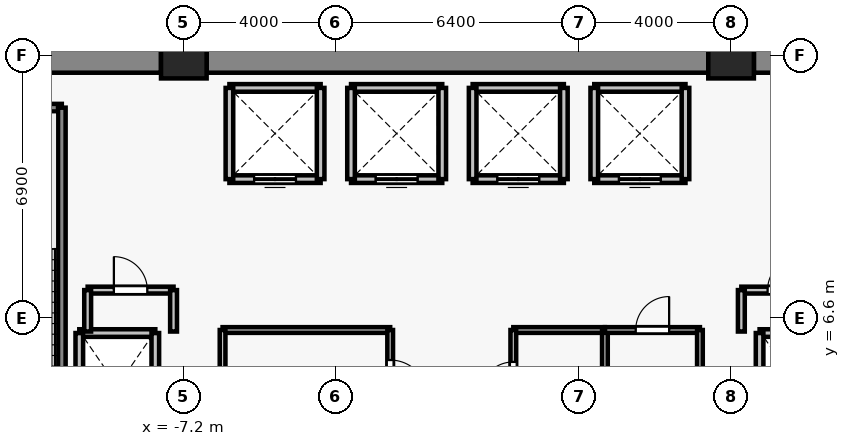
"""IFC4 building model, lengths in metres.
Left out: names, types, materials, properties, quantities, classifications, styles, units other than length and angle.
Written with IfcOpenShell. Run it as: python <this file> out.ifc"""

import sys

from ifc_helpers import new_model, si_unit, direction, frame, frame_2d, origin, origin_2d, place, context, subcontext, project, spatial, rectangle, extrude, source, transform, mapped, element, fill, save


model = new_model("IFC4")
c1 = context("Model", 3, precision=1e-05, world=origin(), true_north=direction((0.0, 1.0)))
c2 = subcontext(c1, "Body", "Model", "MODEL_VIEW")
j1 = project(units=[si_unit("LENGTHUNIT", "METRE"), si_unit("PLANEANGLEUNIT", "RADIAN")], contexts=[c1])
p1 = place(None, origin())
s1 = spatial("IfcSite", under=j1, at=p1, CompositionType="ELEMENT")
p2 = place(p1, origin())
s2 = spatial("IfcBuilding", under=s1, at=p2, CompositionType="ELEMENT")
p3 = place(p2, frame((0.0, 0.0, -4.4)))
s3 = spatial("IfcBuildingStorey", under=s2, at=p3, CompositionType="ELEMENT", Elevation=-4.4)
for number, where, z_axis, x_axis in (
    (1, (-7.2, 13.5, 0.0), (0.0, 0.0, 1.0), (1.0, 0.0, 0.0)),
    (2, (7.2, 13.5, 0.0), (0.0, 0.0, 1.0), (1.0, 0.0, 0.0)),
):
    element("IfcColumn", number, at=place(p3, frame(where, z_axis=z_axis, x_axis=x_axis)), inside=s3, PredefinedType="COLUMN", context=c2, shape_type="SweptSolid", body=[
        extrude(rectangle(XDim=1.2, YDim=1.2, at=origin_2d()), origin(), (0.0, 0.0, 1.0), 4.4),
    ])
p4 = place(p3, frame((-13.8, 13.5, 0.0), z_axis=(0.0, 0.0, 1.0), x_axis=(1.0, 0.0, 0.0)))
e3 = element("IfcWall", 3, at=p4, inside=s3, PredefinedType="SHEAR", context=c2, shape_type="SweptSolid", body=[
    extrude(rectangle(XDim=6.0, YDim=0.9, at=frame_2d((3.0, 0.0))), origin(), (0.0, 0.0, 1.0), 4.1),
])
p5 = place(p3, frame((-6.6, 13.5, 0.0), z_axis=(0.0, 0.0, 1.0), x_axis=(1.0, 0.0, 0.0)))
e4 = element("IfcWall", 4, at=p5, inside=s3, PredefinedType="SHEAR", context=c2, shape_type="SweptSolid", body=[
    extrude(rectangle(XDim=13.2, YDim=0.9, at=frame_2d((6.6, 0.0))), origin(), (0.0, 0.0, 1.0), 4.1),
])
p6 = place(p3, frame((7.8, 13.5, 0.0), z_axis=(0.0, 0.0, 1.0), x_axis=(1.0, 0.0, 0.0)))
e5 = element("IfcWall", 5, at=p6, inside=s3, PredefinedType="SHEAR", context=c2, shape_type="SweptSolid", body=[
    extrude(rectangle(XDim=6.0, YDim=0.9, at=frame_2d((3.0, 0.0))), origin(), (0.0, 0.0, 1.0), 4.1),
])
p7 = place(p3, frame((-9.95, 6.2, 0.0), z_axis=(0.0, 0.0, 1.0), x_axis=(1.0, 0.0, 0.0)))
e6 = element("IfcWall", 6, at=p7, inside=s3, PredefinedType="SOLIDWALL", context=c2, shape_type="SweptSolid", body=[
    extrude(rectangle(XDim=2.0, YDim=0.2, at=frame_2d((1.0, 0.0))), origin(), (0.0, 0.0, 1.0), 4.1),
])
for number, where, z_axis, x_axis in (
    (7, (-9.95, 3.4, 0.0), (0.0, 0.0, 1.0), (0.0, 1.0, 0.0)),
    (8, (-7.95, 6.2, 0.0), (0.0, 0.0, 1.0), (0.0, -1.0, 0.0)),
):
    element("IfcWall", number, at=place(p3, frame(where, z_axis=z_axis, x_axis=x_axis)), inside=s3, PredefinedType="SOLIDWALL", context=c2, shape_type="SweptSolid", body=[
        extrude(rectangle(XDim=2.8, YDim=0.2, at=frame_2d((1.4, 0.0))), origin(), (0.0, 0.0, 1.0), 4.1),
    ])
p8 = place(p3, frame((7.95, 6.2, 0.0), z_axis=(0.0, 0.0, 1.0), x_axis=(1.0, 0.0, 0.0)))
e9 = element("IfcWall", 9, at=p8, inside=s3, PredefinedType="SOLIDWALL", context=c2, shape_type="SweptSolid", body=[
    extrude(rectangle(XDim=2.0, YDim=0.2, at=frame_2d((1.0, 0.0))), origin(), (0.0, 0.0, 1.0), 4.1),
])
p9 = place(p3, frame((7.95, 3.4, 0.0), z_axis=(0.0, 0.0, 1.0), x_axis=(0.0, 1.0, 0.0)))
e10 = element("IfcWall", 10, at=p9, inside=s3, PredefinedType="SOLIDWALL", context=c2, shape_type="SweptSolid", body=[
    extrude(rectangle(XDim=2.8, YDim=0.2, at=frame_2d((1.4, 0.0))), origin(), (0.0, 0.0, 1.0), 4.1),
])
p10 = place(p3, frame((-3.6, 10.25, 0.0), z_axis=(0.0, 0.0, 1.0), x_axis=(-1.0, 0.0, 0.0)))
e11 = element("IfcWall", 11, at=p10, inside=s3, PredefinedType="SOLIDWALL", context=c2, shape_type="SweptSolid", body=[
    extrude(rectangle(XDim=2.4, YDim=0.2, at=frame_2d((1.2, 0.0))), origin(), (0.0, 0.0, 1.0), 4.1),
])
p11 = place(p10, frame((0.65, 0.0, 0.0)))
e12 = element("IfcOpeningElement", 12, at=p11, cuts=e11, PredefinedType="OPENING", context=c2, shape_type="SweptSolid", body=[
    extrude(rectangle(XDim=1.1, YDim=2.2, at=frame_2d((0.55, 1.1))), frame((0.0, 0.11, 0.0), z_axis=(0.0, -1.0, 0.0), x_axis=(1.0, 0.0, 0.0)), (0.0, 0.0, 1.0), 0.22),
])
for number, where, z_axis, x_axis in (
    (13, (-6.0, 12.65, 0.0), (0.0, 0.0, 1.0), (1.0, 0.0, 0.0)),
    (14, (-6.0, 10.25, 0.0), (0.0, 0.0, 1.0), (0.0, 1.0, 0.0)),
    (15, (-3.6, 12.65, 0.0), (0.0, 0.0, 1.0), (0.0, -1.0, 0.0)),
):
    element("IfcWall", number, at=place(p3, frame(where, z_axis=z_axis, x_axis=x_axis)), inside=s3, PredefinedType="SOLIDWALL", context=c2, shape_type="SweptSolid", body=[
        extrude(rectangle(XDim=2.4, YDim=0.2, at=frame_2d((1.2, 0.0))), origin(), (0.0, 0.0, 1.0), 4.1),
    ])
p12 = place(p3, frame((-0.4, 10.25, 0.0), z_axis=(0.0, 0.0, 1.0), x_axis=(-1.0, 0.0, 0.0)))
e16 = element("IfcWall", 16, at=p12, inside=s3, PredefinedType="SOLIDWALL", context=c2, shape_type="SweptSolid", body=[
    extrude(rectangle(XDim=2.4, YDim=0.2, at=frame_2d((1.2, 0.0))), origin(), (0.0, 0.0, 1.0), 4.1),
])
p13 = place(p12, frame((0.65, 0.0, 0.0)))
e17 = element("IfcOpeningElement", 17, at=p13, cuts=e16, PredefinedType="OPENING", context=c2, shape_type="SweptSolid", body=[
    extrude(rectangle(XDim=1.1, YDim=2.2, at=frame_2d((0.55, 1.1))), frame((0.0, 0.11, 0.0), z_axis=(0.0, -1.0, 0.0), x_axis=(1.0, 0.0, 0.0)), (0.0, 0.0, 1.0), 0.22),
])
p14 = place(p3, frame((-2.8, 12.65, 0.0), z_axis=(0.0, 0.0, 1.0), x_axis=(1.0, 0.0, 0.0)))
e18 = element("IfcWall", 18, at=p14, inside=s3, PredefinedType="SOLIDWALL", context=c2, shape_type="SweptSolid", body=[
    extrude(rectangle(XDim=2.4, YDim=0.2, at=frame_2d((1.2, 0.0))), origin(), (0.0, 0.0, 1.0), 4.1),
])
for number, where, z_axis, x_axis in (
    (19, (-2.8, 10.25, 0.0), (0.0, 0.0, 1.0), (0.0, 1.0, 0.0)),
    (20, (-0.4, 12.65, 0.0), (0.0, 0.0, 1.0), (0.0, -1.0, 0.0)),
):
    element("IfcWall", number, at=place(p3, frame(where, z_axis=z_axis, x_axis=x_axis)), inside=s3, PredefinedType="SOLIDWALL", context=c2, shape_type="SweptSolid", body=[
        extrude(rectangle(XDim=2.4, YDim=0.2, at=frame_2d((1.2, 0.0))), origin(), (0.0, 0.0, 1.0), 4.1),
    ])
p15 = place(p3, frame((2.8, 10.25, 0.0), z_axis=(0.0, 0.0, 1.0), x_axis=(-1.0, 0.0, 0.0)))
e21 = element("IfcWall", 21, at=p15, inside=s3, PredefinedType="SOLIDWALL", context=c2, shape_type="SweptSolid", body=[
    extrude(rectangle(XDim=2.4, YDim=0.2, at=frame_2d((1.2, 0.0))), origin(), (0.0, 0.0, 1.0), 4.1),
])
p16 = place(p15, frame((0.65, 0.0, 0.0)))
e22 = element("IfcOpeningElement", 22, at=p16, cuts=e21, PredefinedType="OPENING", context=c2, shape_type="SweptSolid", body=[
    extrude(rectangle(XDim=1.1, YDim=2.2, at=frame_2d((0.55, 1.1))), frame((0.0, 0.11, 0.0), z_axis=(0.0, -1.0, 0.0), x_axis=(1.0, 0.0, 0.0)), (0.0, 0.0, 1.0), 0.22),
])
p17 = place(p3, frame((0.4, 12.65, 0.0), z_axis=(0.0, 0.0, 1.0), x_axis=(1.0, 0.0, 0.0)))
e23 = element("IfcWall", 23, at=p17, inside=s3, PredefinedType="SOLIDWALL", context=c2, shape_type="SweptSolid", body=[
    extrude(rectangle(XDim=2.4, YDim=0.2, at=frame_2d((1.2, 0.0))), origin(), (0.0, 0.0, 1.0), 4.1),
])
for number, where, z_axis, x_axis in (
    (24, (0.4, 10.25, 0.0), (0.0, 0.0, 1.0), (0.0, 1.0, 0.0)),
    (25, (2.8, 12.65, 0.0), (0.0, 0.0, 1.0), (0.0, -1.0, 0.0)),
):
    element("IfcWall", number, at=place(p3, frame(where, z_axis=z_axis, x_axis=x_axis)), inside=s3, PredefinedType="SOLIDWALL", context=c2, shape_type="SweptSolid", body=[
        extrude(rectangle(XDim=2.4, YDim=0.2, at=frame_2d((1.2, 0.0))), origin(), (0.0, 0.0, 1.0), 4.1),
    ])
p18 = place(p3, frame((6.0, 10.25, 0.0), z_axis=(0.0, 0.0, 1.0), x_axis=(-1.0, 0.0, 0.0)))
e26 = element("IfcWall", 26, at=p18, inside=s3, PredefinedType="SOLIDWALL", context=c2, shape_type="SweptSolid", body=[
    extrude(rectangle(XDim=2.4, YDim=0.2, at=frame_2d((1.2, 0.0))), origin(), (0.0, 0.0, 1.0), 4.1),
])
p19 = place(p18, frame((0.65, 0.0, 0.0)))
e27 = element("IfcOpeningElement", 27, at=p19, cuts=e26, PredefinedType="OPENING", context=c2, shape_type="SweptSolid", body=[
    extrude(rectangle(XDim=1.1, YDim=2.2, at=frame_2d((0.55, 1.1))), frame((0.0, 0.11, 0.0), z_axis=(0.0, -1.0, 0.0), x_axis=(1.0, 0.0, 0.0)), (0.0, 0.0, 1.0), 0.22),
])
for number, where, z_axis, x_axis in (
    (28, (3.6, 12.65, 0.0), (0.0, 0.0, 1.0), (1.0, 0.0, 0.0)),
    (29, (3.6, 10.25, 0.0), (0.0, 0.0, 1.0), (0.0, 1.0, 0.0)),
    (30, (6.0, 12.65, 0.0), (0.0, 0.0, 1.0), (0.0, -1.0, 0.0)),
):
    element("IfcWall", number, at=place(p3, frame(where, z_axis=z_axis, x_axis=x_axis)), inside=s3, PredefinedType="SOLIDWALL", context=c2, shape_type="SweptSolid", body=[
        extrude(rectangle(XDim=2.4, YDim=0.2, at=frame_2d((1.2, 0.0))), origin(), (0.0, 0.0, 1.0), 4.1),
    ])
p20 = place(p3, frame((-13.93, 12.13, 0.0), z_axis=(0.0, 0.0, 1.0), x_axis=(1.0, 0.0, 0.0)))
e31 = element("IfcWall", 31, at=p20, inside=s3, PredefinedType="SOLIDWALL", context=c2, shape_type="SweptSolid", body=[
    extrude(rectangle(XDim=3.52, YDim=0.2, at=frame_2d((1.76, 0.0))), origin(), (0.0, 0.0, 1.0), 4.1),
])
p21 = place(p3, frame((-10.41, 12.13, 0.0), z_axis=(0.0, 0.0, 1.0), x_axis=(0.0, -1.0, 0.0)))
e32 = element("IfcWall", 32, at=p21, inside=s3, PredefinedType="SOLIDWALL", context=c2, shape_type="SweptSolid", body=[
    extrude(rectangle(XDim=8.84, YDim=0.2, at=frame_2d((4.42, 0.0))), origin(), (0.0, 0.0, 1.0), 4.1),
])
p22 = place(p3, frame((-9.73, 7.33, 0.0), z_axis=(0.0, 0.0, 1.0), x_axis=(1.0, 0.0, 0.0)))
e33 = element("IfcWall", 33, at=p22, inside=s3, PredefinedType="PARTITIONING", context=c2, shape_type="SweptSolid", body=[
    extrude(rectangle(XDim=2.26, YDim=0.18, at=frame_2d((1.13, 0.0))), origin(), (0.0, 0.0, 1.0), 3.19),
])
p23 = place(p22, frame((0.69, 0.0, 0.0)))
e34 = element("IfcOpeningElement", 34, at=p23, cuts=e33, PredefinedType="OPENING", context=c2, shape_type="SweptSolid", body=[
    extrude(rectangle(XDim=0.88, YDim=2.1, at=frame_2d((0.44, 1.05))), frame((0.0, 0.1, 0.0), z_axis=(0.0, -1.0, 0.0), x_axis=(1.0, 0.0, 0.0)), (0.0, 0.0, 1.0), 0.2),
])
p24 = place(p3, frame((-9.73, 6.24, 0.0), z_axis=(0.0, 0.0, 1.0), x_axis=(0.0, 1.0, 0.0)))
e35 = element("IfcWall", 35, at=p24, inside=s3, PredefinedType="PARTITIONING", context=c2, shape_type="SweptSolid", body=[
    extrude(rectangle(XDim=1.09, YDim=0.18, at=frame_2d((0.545, 0.0))), origin(), (0.0, 0.0, 1.0), 4.1),
])
p25 = place(p3, frame((-7.47, 7.33, 0.0), z_axis=(0.0, 0.0, 1.0), x_axis=(0.0, -1.0, 0.0)))
e36 = element("IfcWall", 36, at=p25, inside=s3, PredefinedType="PARTITIONING", context=c2, shape_type="SweptSolid", body=[
    extrude(rectangle(XDim=1.09, YDim=0.18, at=frame_2d((0.545, 0.0))), origin(), (0.0, 0.0, 1.0), 3.19),
])
p26 = place(p3, frame((7.47, 7.33, 0.0), z_axis=(0.0, 0.0, 1.0), x_axis=(1.0, 0.0, 0.0)))
e37 = element("IfcWall", 37, at=p26, inside=s3, PredefinedType="PARTITIONING", context=c2, shape_type="SweptSolid", body=[
    extrude(rectangle(XDim=2.26, YDim=0.18, at=frame_2d((1.13, 0.0))), origin(), (0.0, 0.0, 1.0), 3.19),
])
p27 = place(p26, frame((0.69, 0.0, 0.0)))
e38 = element("IfcOpeningElement", 38, at=p27, cuts=e37, PredefinedType="OPENING", context=c2, shape_type="SweptSolid", body=[
    extrude(rectangle(XDim=0.88, YDim=2.1, at=frame_2d((0.44, 1.05))), frame((0.0, 0.1, 0.0), z_axis=(0.0, -1.0, 0.0), x_axis=(1.0, 0.0, 0.0)), (0.0, 0.0, 1.0), 0.2),
])
p28 = place(p3, frame((7.47, 6.24, 0.0), z_axis=(0.0, 0.0, 1.0), x_axis=(0.0, 1.0, 0.0)))
e39 = element("IfcWall", 39, at=p28, inside=s3, PredefinedType="PARTITIONING", context=c2, shape_type="SweptSolid", body=[
    extrude(rectangle(XDim=1.09, YDim=0.18, at=frame_2d((0.545, 0.0))), origin(), (0.0, 0.0, 1.0), 3.19),
])
p29 = place(p3, frame((-6.18, 6.28, 0.0), z_axis=(0.0, 0.0, 1.0), x_axis=(1.0, 0.0, 0.0)))
e40 = element("IfcWall", 40, at=p29, inside=s3, PredefinedType="PARTITIONING", context=c2, shape_type="SweptSolid", body=[
    extrude(rectangle(XDim=4.41, YDim=0.15, at=frame_2d((2.205, 0.0))), origin(), (0.0, 0.0, 1.0), 4.1),
])
p30 = place(p3, frame((-6.18, 3.76, 0.0), z_axis=(0.0, 0.0, 1.0), x_axis=(0.0, 1.0, 0.0)))
e41 = element("IfcWall", 41, at=p30, inside=s3, PredefinedType="PARTITIONING", context=c2, shape_type="SweptSolid", body=[
    extrude(rectangle(XDim=2.52, YDim=0.15, at=frame_2d((1.26, 0.0))), origin(), (0.0, 0.0, 1.0), 4.1),
])
p31 = place(p3, frame((-1.77, 6.28, 0.0), z_axis=(0.0, 0.0, 1.0), x_axis=(0.0, -1.0, 0.0)))
e42 = element("IfcWall", 42, at=p31, inside=s3, PredefinedType="PARTITIONING", context=c2, shape_type="SweptSolid", body=[
    extrude(rectangle(XDim=2.52, YDim=0.15, at=frame_2d((1.26, 0.0))), origin(), (0.0, 0.0, 1.0), 4.1),
])
p32 = place(p31, frame((0.79, 0.0, 0.0)))
e43 = element("IfcOpeningElement", 43, at=p32, cuts=e42, PredefinedType="OPENING", context=c2, shape_type="SweptSolid", body=[
    extrude(rectangle(XDim=0.98, YDim=2.15, at=frame_2d((0.49, 1.075))), frame((0.0, 0.085, 0.0), z_axis=(0.0, -1.0, 0.0), x_axis=(1.0, 0.0, 0.0)), (0.0, 0.0, 1.0), 0.17),
])
p33 = place(p3, frame((1.47, 6.28, 0.0), z_axis=(0.0, 0.0, 1.0), x_axis=(1.0, 0.0, 0.0)))
e44 = element("IfcWall", 44, at=p33, inside=s3, PredefinedType="PARTITIONING", context=c2, shape_type="SweptSolid", body=[
    extrude(rectangle(XDim=2.41, YDim=0.15, at=frame_2d((1.205, 0.0))), origin(), (0.0, 0.0, 1.0), 4.1),
])
p34 = place(p3, frame((1.47, 3.76, 0.0), z_axis=(0.0, 0.0, 1.0), x_axis=(0.0, 1.0, 0.0)))
e45 = element("IfcWall", 45, at=p34, inside=s3, PredefinedType="PARTITIONING", context=c2, shape_type="SweptSolid", body=[
    extrude(rectangle(XDim=2.52, YDim=0.15, at=frame_2d((1.26, 0.0))), origin(), (0.0, 0.0, 1.0), 4.1),
])
p35 = place(p34, frame((0.8, 0.0, 0.0)))
e46 = element("IfcOpeningElement", 46, at=p35, cuts=e45, PredefinedType="OPENING", context=c2, shape_type="SweptSolid", body=[
    extrude(rectangle(XDim=0.88, YDim=2.1, at=frame_2d((0.44, 1.05))), frame((0.0, 0.085, 0.0), z_axis=(0.0, -1.0, 0.0), x_axis=(1.0, 0.0, 0.0)), (0.0, 0.0, 1.0), 0.17),
])
p36 = place(p3, frame((3.88, 6.28, 0.0), z_axis=(0.0, 0.0, 1.0), x_axis=(0.0, -1.0, 0.0)))
e47 = element("IfcWall", 47, at=p36, inside=s3, PredefinedType="PARTITIONING", context=c2, shape_type="SweptSolid", body=[
    extrude(rectangle(XDim=2.52, YDim=0.15, at=frame_2d((1.26, 0.0))), origin(), (0.0, 0.0, 1.0), 4.1),
])
p37 = place(p3, frame((3.88, 6.28, 0.0), z_axis=(0.0, 0.0, 1.0), x_axis=(1.0, 0.0, 0.0)))
e48 = element("IfcWall", 48, at=p37, inside=s3, PredefinedType="PARTITIONING", context=c2, shape_type="SweptSolid", body=[
    extrude(rectangle(XDim=2.5, YDim=0.15, at=frame_2d((1.25, 0.0))), origin(), (0.0, 0.0, 1.0), 4.1),
])
p38 = place(p37, frame((0.81, 0.0, 0.0)))
e49 = element("IfcOpeningElement", 49, at=p38, cuts=e48, PredefinedType="OPENING", context=c2, shape_type="SweptSolid", body=[
    extrude(rectangle(XDim=0.88, YDim=2.15, at=frame_2d((0.44, 1.075))), frame((0.0, 0.085, 0.0), z_axis=(0.0, -1.0, 0.0), x_axis=(1.0, 0.0, 0.0)), (0.0, 0.0, 1.0), 0.17),
])
p39 = place(p3, frame((6.38, 6.28, 0.0), z_axis=(0.0, 0.0, 1.0), x_axis=(0.0, -1.0, 0.0)))
e50 = element("IfcWall", 50, at=p39, inside=s3, PredefinedType="PARTITIONING", context=c2, shape_type="SweptSolid", body=[
    extrude(rectangle(XDim=2.52, YDim=0.15, at=frame_2d((1.26, 0.0))), origin(), (0.0, 0.0, 1.0), 4.1),
])
m1 = source(origin(), c2, "Body", "SweptSolid", [
    extrude(rectangle(XDim=1.1, YDim=2.2, at=frame_2d((0.55, 1.1))), frame((0.0, 0.025, 0.0), z_axis=(0.0, -1.0, 0.0), x_axis=(1.0, 0.0, 0.0)), (0.0, 0.0, 1.0), 0.05),
])
p40 = place(p11, origin())
e51 = element("IfcDoor", 51, at=p40, inside=s3, OperationType="DOUBLE_DOOR_SLIDING", PredefinedType="DOOR", context=c2, shape_type="MappedRepresentation", body=[
    mapped(m1, transform((0.0, 0.0, 0.0), x_axis=(1.0, 0.0, 0.0), y_axis=(0.0, 1.0, 0.0), z_axis=(0.0, 0.0, 1.0), scale=1.0)),
])
fill(e12, e51)
p41 = place(p13, origin())
e52 = element("IfcDoor", 52, at=p41, inside=s3, OperationType="DOUBLE_DOOR_SLIDING", PredefinedType="DOOR", context=c2, shape_type="MappedRepresentation", body=[
    mapped(m1, transform((0.0, 0.0, 0.0), x_axis=(1.0, 0.0, 0.0), y_axis=(0.0, 1.0, 0.0), z_axis=(0.0, 0.0, 1.0), scale=1.0)),
])
fill(e17, e52)
p42 = place(p16, origin())
e53 = element("IfcDoor", 53, at=p42, inside=s3, OperationType="DOUBLE_DOOR_SLIDING", PredefinedType="DOOR", context=c2, shape_type="MappedRepresentation", body=[
    mapped(m1, transform((0.0, 0.0, 0.0), x_axis=(1.0, 0.0, 0.0), y_axis=(0.0, 1.0, 0.0), z_axis=(0.0, 0.0, 1.0), scale=1.0)),
])
fill(e22, e53)
p43 = place(p19, origin())
e54 = element("IfcDoor", 54, at=p43, inside=s3, OperationType="DOUBLE_DOOR_SLIDING", PredefinedType="DOOR", context=c2, shape_type="MappedRepresentation", body=[
    mapped(m1, transform((0.0, 0.0, 0.0), x_axis=(1.0, 0.0, 0.0), y_axis=(0.0, 1.0, 0.0), z_axis=(0.0, 0.0, 1.0), scale=1.0)),
])
fill(e27, e54)
m2 = source(origin(), c2, "Body", "SweptSolid", [
    extrude(rectangle(XDim=0.98, YDim=2.15, at=frame_2d((0.49, 1.075))), frame((0.0, 0.025, 0.0), z_axis=(0.0, -1.0, 0.0), x_axis=(1.0, 0.0, 0.0)), (0.0, 0.0, 1.0), 0.05),
])
p44 = place(p32, origin())
e55 = element("IfcDoor", 55, at=p44, inside=s3, OperationType="SINGLE_SWING_RIGHT", PredefinedType="DOOR", context=c2, shape_type="MappedRepresentation", body=[
    mapped(m2, transform((0.0, 0.0, 0.0), x_axis=(1.0, 0.0, 0.0), y_axis=(0.0, 1.0, 0.0), z_axis=(0.0, 0.0, 1.0), scale=1.0)),
])
fill(e43, e55)
m3 = source(origin(), c2, "Body", "SweptSolid", [
    extrude(rectangle(XDim=0.88, YDim=2.1, at=frame_2d((0.44, 1.05))), frame((0.0, 0.025, 0.0), z_axis=(0.0, -1.0, 0.0), x_axis=(1.0, 0.0, 0.0)), (0.0, 0.0, 1.0), 0.05),
])
p45 = place(p35, origin())
e56 = element("IfcDoor", 56, at=p45, inside=s3, OperationType="SINGLE_SWING_LEFT", PredefinedType="DOOR", context=c2, shape_type="MappedRepresentation", body=[
    mapped(m3, transform((0.0, 0.0, 0.0), x_axis=(1.0, 0.0, 0.0), y_axis=(0.0, 1.0, 0.0), z_axis=(0.0, 0.0, 1.0), scale=1.0)),
])
fill(e46, e56)
m4 = source(origin(), c2, "Body", "SweptSolid", [
    extrude(rectangle(XDim=0.88, YDim=2.15, at=frame_2d((0.44, 1.075))), frame((0.0, 0.025, 0.0), z_axis=(0.0, -1.0, 0.0), x_axis=(1.0, 0.0, 0.0)), (0.0, 0.0, 1.0), 0.05),
])
p46 = place(p38, origin())
e57 = element("IfcDoor", 57, at=p46, inside=s3, OperationType="SINGLE_SWING_RIGHT", PredefinedType="DOOR", context=c2, shape_type="MappedRepresentation", body=[
    mapped(m4, transform((0.0, 0.0, 0.0), x_axis=(1.0, 0.0, 0.0), y_axis=(0.0, 1.0, 0.0), z_axis=(0.0, 0.0, 1.0), scale=1.0)),
])
fill(e49, e57)
p47 = place(p23, origin())
e58 = element("IfcDoor", 58, at=p47, inside=s3, OperationType="SINGLE_SWING_LEFT", PredefinedType="DOOR", context=c2, shape_type="MappedRepresentation", body=[
    mapped(m3, transform((0.0, 0.0, 0.0), x_axis=(1.0, 0.0, 0.0), y_axis=(0.0, 1.0, 0.0), z_axis=(0.0, 0.0, 1.0), scale=1.0)),
])
fill(e34, e58)
p48 = place(p27, origin())
e59 = element("IfcDoor", 59, at=p48, inside=s3, OperationType="SINGLE_SWING_RIGHT", PredefinedType="DOOR", context=c2, shape_type="MappedRepresentation", body=[
    mapped(m3, transform((0.0, 0.0, 0.0), x_axis=(1.0, 0.0, 0.0), y_axis=(0.0, 1.0, 0.0), z_axis=(0.0, 0.0, 1.0), scale=1.0)),
])
fill(e38, e59)
save(model, sys.argv[1])
